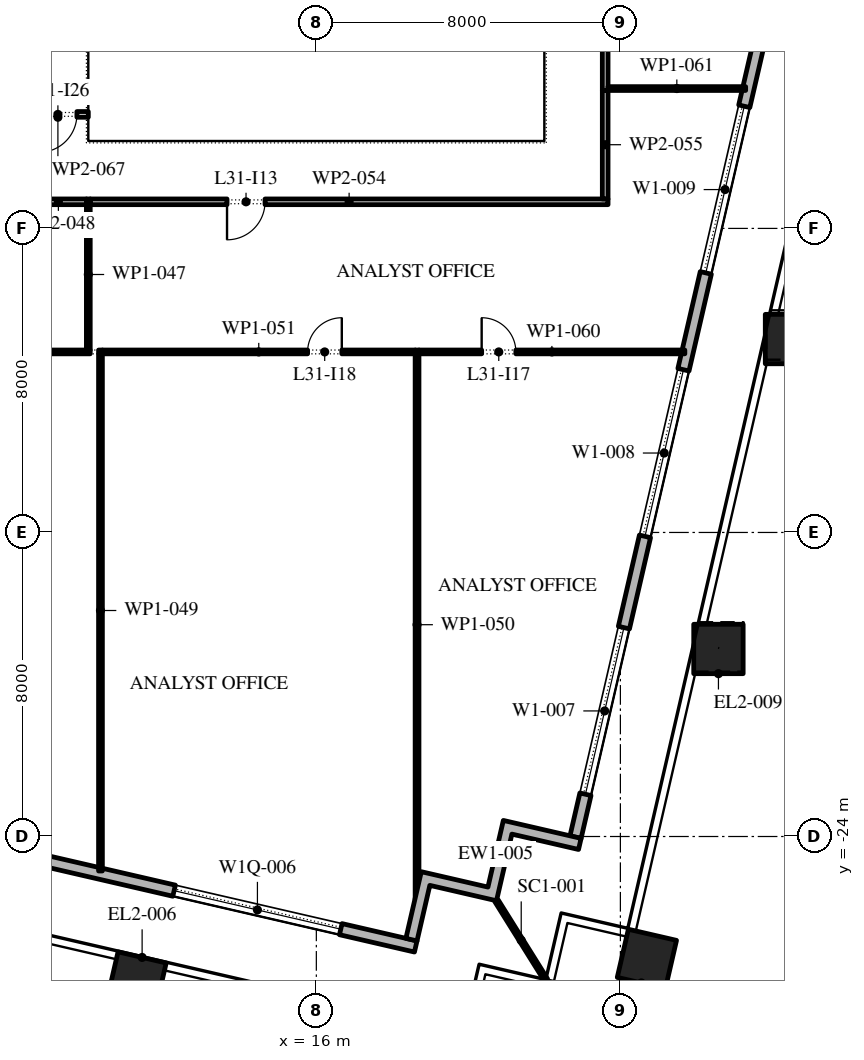
"""IFC4 building model, lengths in metres.
Left out: names, types, materials, properties, quantities, classifications, styles, units other than length and angle.
Written with IfcOpenShell. Run it as: python <this file> out.ifc"""

import sys

from ifc_helpers import new_model, si_unit, direction, frame, frame_2d, origin, origin_2d, place, context, subcontext, project, spatial, polyline, rectangle, outline, extrude, element, fill, save


model = new_model("IFC4")
c1 = context("Model", 3, precision=1e-05, world=origin(), true_north=direction((0.0, 1.0)))
c2 = subcontext(c1, "Body", "Model", "MODEL_VIEW")
j1 = project(units=[si_unit("LENGTHUNIT", "METRE"), si_unit("PLANEANGLEUNIT", "RADIAN")], contexts=[c1])
p1 = place(None, origin())
s1 = spatial("IfcSite", under=j1, at=p1, CompositionType="ELEMENT")
p2 = place(p1, origin())
s2 = spatial("IfcBuilding", under=s1, at=p2, CompositionType="ELEMENT")
p3 = place(p2, frame((0.0, 0.0, 143.4)))
s3 = spatial("IfcBuildingStorey", under=s2, at=p3, CompositionType="ELEMENT", Elevation=143.4)
for number, where, z_axis, x_axis in (
    (1, (11.27, -27.815, 0.0), (0.0, 0.0, 1.0), (0.974, -0.225, 0.0)),
    (2, (24.698, -27.22, 0.0), (0.0, 0.0, 1.0), (0.974, -0.225, 0.0)),
):
    element("IfcColumn", number, at=place(p3, frame(where, z_axis=z_axis, x_axis=x_axis)), inside=s3, PredefinedType="COLUMN", context=c2, shape_type="SweptSolid", body=[
        extrude(rectangle(XDim=1.3, YDim=1.3, at=origin_2d()), origin(), (0.0, 0.0, 1.0), 4.2),
    ])
p4 = place(p3, frame((26.58, -19.066, 0.0), z_axis=(0.002964175891, 0.012670398905, 0.999915333742), x_axis=(-0.973709261374, 0.227794368487, 0.0)))
e3 = element("IfcColumn", 3, at=p4, inside=s3, PredefinedType="COLUMN", context=c2, shape_type="SweptSolid", body=[
    extrude(rectangle(XDim=1.3, YDim=1.3, at=origin_2d()), origin(), (0.0, 0.0, 1.0), 4.2),
])
p5 = place(p3, frame((28.463, -10.911, 0.0), z_axis=(0.005810637908, 0.02533438128, 0.999662145733), x_axis=(-0.974691740237, 0.22355315143, 0.0)))
e4 = element("IfcColumn", 4, at=p5, inside=s3, PredefinedType="COLUMN", context=c2, shape_type="SweptSolid", body=[
    extrude(rectangle(XDim=1.3, YDim=1.3, at=origin_2d()), origin(), (0.0, 0.0, 1.0), 4.202),
])
p6 = place(p3, frame((22.539, -28.569, 0.0), z_axis=(0.0, 0.0, 1.0), x_axis=(0.974370064785, -0.224951054344, 0.0)))
e5 = element("IfcColumn", 5, at=p6, inside=s3, PredefinedType="COLUMN", context=c2, shape_type="SweptSolid", body=[
    extrude(rectangle(XDim=1.3, YDim=1.3, at=origin_2d()), origin(), (0.0, 0.0, 1.0), 4.2),
])
p7 = place(p3, frame((-31.078, -15.421, 0.0), z_axis=(0.0, 0.0, 1.0), x_axis=(0.974370456532, -0.224949357493, 0.0)))
e6 = element("IfcWall", 6, at=p7, inside=s3, PredefinedType="STANDARD", context=c2, shape_type="SweptSolid", body=[
    extrude(rectangle(XDim=51.0, YDim=0.3, at=frame_2d((25.5, 0.0))), origin(), (0.0, 0.0, 1.0), 4.0),
])
p8 = place(p7, frame((1.875, 0.0, 0.45)))
e7 = element("IfcOpeningElement", 7, at=p8, cuts=e6, PredefinedType="OPENING", context=c2, shape_type="SweptSolid", body=[
    extrude(rectangle(XDim=4.5, YDim=2.575, at=frame_2d((2.25, 1.288))), frame((0.0, 0.16, 0.0), z_axis=(0.0, -1.0, 0.0), x_axis=(1.0, 0.0, 0.0)), (0.0, 0.0, 1.0), 0.32),
])
p9 = place(p7, frame((10.275, 0.0, 0.45)))
e8 = element("IfcOpeningElement", 8, at=p9, cuts=e6, PredefinedType="OPENING", context=c2, shape_type="SweptSolid", body=[
    extrude(rectangle(XDim=4.5, YDim=2.525, at=frame_2d((2.25, 1.262))), frame((0.0, 0.16, 0.0), z_axis=(0.0, -1.0, 0.0), x_axis=(1.0, 0.0, 0.0)), (0.0, 0.0, 1.0), 0.32),
])
p10 = place(p7, frame((18.825, 0.0, 0.45)))
e9 = element("IfcOpeningElement", 9, at=p10, cuts=e6, PredefinedType="OPENING", context=c2, shape_type="SweptSolid", body=[
    extrude(rectangle(XDim=4.5, YDim=2.5, at=frame_2d((2.25, 1.25))), frame((0.0, 0.16, 0.0), z_axis=(0.0, -1.0, 0.0), x_axis=(1.0, 0.0, 0.0)), (0.0, 0.0, 1.0), 0.32),
])
p11 = place(p7, frame((27.075, 0.0, 0.0)))
e10 = element("IfcOpeningElement", 10, at=p11, cuts=e6, PredefinedType="OPENING", context=c2, shape_type="SweptSolid", body=[
    extrude(rectangle(XDim=2.4, YDim=3.5, at=frame_2d((1.2, 1.75))), frame((0.0, 0.16, 0.0), z_axis=(0.0, -1.0, 0.0), x_axis=(1.0, 0.0, 0.0)), (0.0, 0.0, 1.0), 0.32),
])
p12 = place(p7, frame((35.925, 0.0, 0.45)))
e11 = element("IfcOpeningElement", 11, at=p12, cuts=e6, PredefinedType="OPENING", context=c2, shape_type="SweptSolid", body=[
    extrude(rectangle(XDim=4.5, YDim=2.45, at=frame_2d((2.25, 1.225))), frame((0.0, 0.16, 0.0), z_axis=(0.0, -1.0, 0.0), x_axis=(1.0, 0.0, 0.0)), (0.0, 0.0, 1.0), 0.32),
])
p13 = place(p7, frame((44.475, 0.0, 0.45)))
e12 = element("IfcOpeningElement", 12, at=p13, cuts=e6, PredefinedType="OPENING", context=c2, shape_type="SweptSolid", body=[
    extrude(rectangle(XDim=4.5, YDim=2.45, at=frame_2d((2.25, 1.225))), frame((0.0, 0.16, 0.0), z_axis=(0.0, -1.0, 0.0), x_axis=(1.0, 0.0, 0.0)), (0.0, 0.0, 1.0), 0.32),
])
p14 = place(p3, frame((22.82, -24.016, 0.0), z_axis=(0.0, 0.0, 1.0), x_axis=(0.224953880882, 0.974369412223, 0.0)))
e13 = element("IfcWall", 13, at=p14, inside=s3, PredefinedType="STANDARD", context=c2, shape_type="SweptSolid", body=[
    extrude(rectangle(XDim=49.5, YDim=0.3, at=frame_2d((24.75, 0.0))), origin(), (0.0, 0.0, 1.0), 4.0),
])
p15 = place(p14, frame((1.157, 0.0, 0.45)))
e14 = element("IfcOpeningElement", 14, at=p15, cuts=e13, PredefinedType="OPENING", context=c2, shape_type="SweptSolid", body=[
    extrude(rectangle(XDim=4.5, YDim=3.05, at=frame_2d((2.25, 1.525))), frame((0.0, 0.16, 0.0), z_axis=(0.0, -1.0, 0.0), x_axis=(1.0, 0.0, 0.0)), (0.0, 0.0, 1.0), 0.32),
])
p16 = place(p14, frame((8.121, 0.0, 0.45)))
e15 = element("IfcOpeningElement", 15, at=p16, cuts=e13, PredefinedType="OPENING", context=c2, shape_type="SweptSolid", body=[
    extrude(rectangle(XDim=4.5, YDim=3.05, at=frame_2d((2.25, 1.525))), frame((0.0, 0.16, 0.0), z_axis=(0.0, -1.0, 0.0), x_axis=(1.0, 0.0, 0.0)), (0.0, 0.0, 1.0), 0.32),
])
p17 = place(p14, frame((15.236, 0.0, 0.45)))
e16 = element("IfcOpeningElement", 16, at=p17, cuts=e13, PredefinedType="OPENING", context=c2, shape_type="SweptSolid", body=[
    extrude(rectangle(XDim=4.5, YDim=3.05, at=frame_2d((2.25, 1.525))), frame((0.0, 0.16, 0.0), z_axis=(0.0, -1.0, 0.0), x_axis=(1.0, 0.0, 0.0)), (0.0, 0.0, 1.0), 0.32),
])
p18 = place(p14, frame((23.4, 0.0, 0.0)))
e17 = element("IfcOpeningElement", 17, at=p18, cuts=e13, PredefinedType="OPENING", context=c2, shape_type="SweptSolid", body=[
    extrude(rectangle(XDim=2.4, YDim=3.5, at=frame_2d((1.2, 1.75))), frame((0.0, 0.16, 0.0), z_axis=(0.0, -1.0, 0.0), x_axis=(1.0, 0.0, 0.0)), (0.0, 0.0, 1.0), 0.32),
])
p19 = place(p14, frame((29.464, 0.0, 0.45)))
e18 = element("IfcOpeningElement", 18, at=p19, cuts=e13, PredefinedType="OPENING", context=c2, shape_type="SweptSolid", body=[
    extrude(rectangle(XDim=4.5, YDim=2.875, at=frame_2d((2.25, 1.438))), frame((0.0, 0.16, 0.0), z_axis=(0.0, -1.0, 0.0), x_axis=(1.0, 0.0, 0.0)), (0.0, 0.0, 1.0), 0.32),
])
p20 = place(p14, frame((36.579, 0.0, 0.45)))
e19 = element("IfcOpeningElement", 19, at=p20, cuts=e13, PredefinedType="OPENING", context=c2, shape_type="SweptSolid", body=[
    extrude(rectangle(XDim=4.5, YDim=2.825, at=frame_2d((2.25, 1.413))), frame((0.0, 0.16, 0.0), z_axis=(0.0, -1.0, 0.0), x_axis=(1.0, 0.0, 0.0)), (0.0, 0.0, 1.0), 0.32),
])
p21 = place(p14, frame((43.693, 0.0, 0.45)))
e20 = element("IfcOpeningElement", 20, at=p21, cuts=e13, PredefinedType="OPENING", context=c2, shape_type="SweptSolid", body=[
    extrude(rectangle(XDim=4.5, YDim=2.75, at=frame_2d((2.25, 1.375))), frame((0.0, 0.16, 0.0), z_axis=(0.0, -1.0, 0.0), x_axis=(1.0, 0.0, 0.0)), (0.0, 0.0, 1.0), 0.32),
])
p22 = place(p3, origin())
e21 = element("IfcWall", 21, at=p22, inside=s3, PredefinedType="STANDARD", context=c2, shape_type="SweptSolid", body=[
    extrude(outline(polyline([(20.515, -25.331), (20.92, -23.577), (22.967, -24.049), (22.899, -24.342), (21.145, -23.937), (20.74, -25.691), (18.986, -25.286), (18.649, -26.747), (18.357, -26.68), (18.762, -24.926), (20.515, -25.331)])), origin(), (0.0, 0.0, 1.0), 4.0),
])
p23 = place(p3, frame((20.74, -25.691, -0.05), z_axis=(0.0, 0.0, 1.0), x_axis=(0.529972121605, -0.848015064914, 0.0)))
e22 = element("IfcWall", 22, at=p23, inside=s3, PredefinedType="STANDARD", context=c2, shape_type="SweptSolid", body=[
    extrude(rectangle(XDim=2.455, YDim=0.1, at=frame_2d((1.228, 0.0))), origin(), (0.0, 0.0, 1.0), 4.05),
])
p24 = place(p3, frame((10.05, -11.25, 0.0), z_axis=(0.0, 0.0, 1.0), x_axis=(-1.0, 0.0, 0.0)))
e23 = element("IfcWall", 23, at=p24, inside=s3, PredefinedType="PARTITIONING", context=c2, shape_type="SweptSolid", body=[
    extrude(rectangle(XDim=11.99, YDim=0.1, at=frame_2d((5.995, 0.0))), origin(), (0.0, 0.0, 1.0), 4.0),
])
p25 = place(p24, frame((4.44, 0.0, 0.0)))
e24 = element("IfcOpeningElement", 24, at=p25, cuts=e23, PredefinedType="OPENING", context=c2, shape_type="SweptSolid", body=[
    extrude(rectangle(XDim=0.9, YDim=2.1, at=frame_2d((0.45, 1.05))), frame((0.0, 0.06, 0.0), z_axis=(0.0, -1.0, 0.0), x_axis=(1.0, 0.0, 0.0)), (0.0, 0.0, 1.0), 0.12),
])
p26 = place(p3, frame((10.0, -11.2, 0.0), z_axis=(0.0, 0.0, 1.0), x_axis=(0.0, 1.0, 0.0)))
e25 = element("IfcWall", 25, at=p26, inside=s3, PredefinedType="PARTITIONING", context=c2, shape_type="SweptSolid", body=[
    extrude(rectangle(XDim=3.975, YDim=0.1, at=frame_2d((1.987, 0.0))), origin(), (0.0, 0.0, 1.0), 4.0),
])
p27 = place(p3, frame((9.95, -7.3, 0.0), z_axis=(0.0, 0.0, 1.0), x_axis=(-1.0, 0.0, 0.0)))
e26 = element("IfcWall", 26, at=p27, inside=s3, PredefinedType="PARTITIONING", context=c2, shape_type="SweptSolid", body=[
    extrude(rectangle(XDim=1.475, YDim=0.15, at=frame_2d((0.737, 0.0))), origin(), (0.0, 0.0, 1.0), 4.0),
])
p28 = place(p3, frame((10.32, -24.907, 0.0), z_axis=(0.0, 0.0, 1.0), x_axis=(0.0, 1.0, 0.0)))
e27 = element("IfcWall", 27, at=p28, inside=s3, PredefinedType="PARTITIONING", context=c2, shape_type="SweptSolid", body=[
    extrude(rectangle(XDim=13.707, YDim=0.1, at=frame_2d((6.854, 0.0))), origin(), (0.0, 0.0, 1.0), 4.0),
])
p29 = place(p3, frame((18.65, -25.654, 0.0), z_axis=(0.0, 0.0, 1.0), x_axis=(0.0, 1.0, 0.0)))
e28 = element("IfcWall", 28, at=p29, inside=s3, PredefinedType="PARTITIONING", context=c2, shape_type="SweptSolid", body=[
    extrude(rectangle(XDim=14.454, YDim=0.1, at=frame_2d((7.227, 0.0))), origin(), (0.0, 0.0, 1.0), 4.0),
])
p30 = place(p3, frame((18.6, -11.25, 0.0), z_axis=(0.0, 0.0, 1.0), x_axis=(-1.0, 0.0, 0.0)))
e29 = element("IfcWall", 29, at=p30, inside=s3, PredefinedType="PARTITIONING", context=c2, shape_type="SweptSolid", body=[
    extrude(rectangle(XDim=8.23, YDim=0.1, at=frame_2d((4.115, 0.0))), origin(), (0.0, 0.0, 1.0), 4.0),
])
p31 = place(p30, frame((1.93, 0.0, 0.0)))
e30 = element("IfcOpeningElement", 30, at=p31, cuts=e29, PredefinedType="OPENING", context=c2, shape_type="SweptSolid", body=[
    extrude(rectangle(XDim=0.9, YDim=2.1, at=frame_2d((0.45, 1.05))), frame((0.0, 0.06, 0.0), z_axis=(0.0, -1.0, 0.0), x_axis=(1.0, 0.0, 0.0)), (0.0, 0.0, 1.0), 0.12),
])
p32 = place(p3, frame((23.675, -7.3, 0.0), z_axis=(0.0, 0.0, 1.0), x_axis=(-1.0, 0.0, 0.0)))
e31 = element("IfcWall", 31, at=p32, inside=s3, PredefinedType="PARTITIONING", context=c2, shape_type="SweptSolid", body=[
    extrude(rectangle(XDim=13.625, YDim=0.15, at=frame_2d((6.812, 0.0))), origin(), (0.0, 0.0, 1.0), 4.0),
])
p33 = place(p32, frame((9.025, 0.0, 0.0)))
e32 = element("IfcOpeningElement", 32, at=p33, cuts=e31, PredefinedType="OPENING", context=c2, shape_type="SweptSolid", body=[
    extrude(rectangle(XDim=1.0, YDim=2.1, at=frame_2d((0.5, 1.05))), frame((0.0, 0.085, 0.0), z_axis=(0.0, -1.0, 0.0), x_axis=(1.0, 0.0, 0.0)), (0.0, 0.0, 1.0), 0.17),
])
p34 = place(p3, frame((23.6, -4.37, 0.0), z_axis=(0.0, 0.0, 1.0), x_axis=(0.0, -1.0, 0.0)))
e33 = element("IfcWall", 33, at=p34, inside=s3, PredefinedType="PARTITIONING", context=c2, shape_type="SweptSolid", body=[
    extrude(rectangle(XDim=2.855, YDim=0.15, at=frame_2d((1.427, 0.0))), origin(), (0.0, 0.0, 1.0), 4.0),
])
p35 = place(p3, frame((23.6, 10.44, 0.0), z_axis=(0.0, 0.0, 1.0), x_axis=(0.0, -1.0, 0.0)))
e34 = element("IfcWall", 34, at=p35, inside=s3, PredefinedType="PARTITIONING", context=c2, shape_type="SweptSolid", body=[
    extrude(rectangle(XDim=14.81, YDim=0.15, at=frame_2d((7.405, 0.0))), origin(), (0.0, 0.0, 1.0), 4.0),
])
p36 = place(p35, frame((6.86, 0.0, 0.0)))
e35 = element("IfcOpeningElement", 35, at=p36, cuts=e34, PredefinedType="OPENING", context=c2, shape_type="SweptSolid", body=[
    extrude(rectangle(XDim=1.0, YDim=2.1, at=frame_2d((0.5, 1.05))), frame((0.0, 0.085, 0.0), z_axis=(0.0, -1.0, 0.0), x_axis=(1.0, 0.0, 0.0)), (0.0, 0.0, 1.0), 0.17),
])
p37 = place(p3, frame((25.696, -11.25, 0.0), z_axis=(0.0, 0.0, 1.0), x_axis=(-1.0, 0.0, 0.0)))
e36 = element("IfcWall", 36, at=p37, inside=s3, PredefinedType="PARTITIONING", context=c2, shape_type="SweptSolid", body=[
    extrude(rectangle(XDim=6.996, YDim=0.1, at=frame_2d((3.498, 0.0))), origin(), (0.0, 0.0, 1.0), 4.0),
])
p38 = place(p37, frame((4.446, 0.0, 0.0)))
e37 = element("IfcOpeningElement", 37, at=p38, cuts=e36, PredefinedType="OPENING", context=c2, shape_type="SweptSolid", body=[
    extrude(rectangle(XDim=0.9, YDim=2.1, at=frame_2d((0.45, 1.05))), frame((0.0, 0.06, 0.0), z_axis=(0.0, -1.0, 0.0), x_axis=(1.0, 0.0, 0.0)), (0.0, 0.0, 1.0), 0.12),
])
p39 = place(p3, frame((27.296, -4.32, 0.0), z_axis=(0.0, 0.0, 1.0), x_axis=(-1.0, 0.0, 0.0)))
e38 = element("IfcWall", 38, at=p39, inside=s3, PredefinedType="PARTITIONING", context=c2, shape_type="SweptSolid", body=[
    extrude(rectangle(XDim=3.621, YDim=0.1, at=frame_2d((1.811, 0.0))), origin(), (0.0, 0.0, 1.0), 4.0),
])
p40 = place(p3, frame((10.0, -5.0, 0.0), z_axis=(0.0, 0.0, 1.0), x_axis=(-1.0, 0.0, 0.0)))
e39 = element("IfcWall", 39, at=p40, inside=s3, PredefinedType="PARTITIONING", context=c2, shape_type="SweptSolid", body=[
    extrude(rectangle(XDim=1.6, YDim=0.15, at=frame_2d((0.8, 0.0))), origin(), (0.0, 0.0, 1.0), 4.0),
])
p41 = place(p40, frame((0.3, 0.0, 0.0)))
e40 = element("IfcOpeningElement", 40, at=p41, cuts=e39, PredefinedType="OPENING", context=c2, shape_type="SweptSolid", body=[
    extrude(rectangle(XDim=1.0, YDim=2.1, at=frame_2d((0.5, 1.05))), frame((0.0, 0.085, 0.0), z_axis=(0.0, -1.0, 0.0), x_axis=(1.0, 0.0, 0.0)), (0.0, 0.0, 1.0), 0.17),
])
p42 = place(p13, origin())
e41 = element("IfcWindow", 41, at=p42, inside=s3, PartitioningType="DOUBLE_PANEL_VERTICAL", PredefinedType="WINDOW", context=c2, shape_type="SweptSolid", body=[
    extrude(rectangle(XDim=4.5, YDim=2.45, at=frame_2d((2.25, 1.225))), frame((0.0, 0.03, 0.0), z_axis=(0.0, -1.0, 0.0), x_axis=(1.0, 0.0, 0.0)), (0.0, 0.0, 1.0), 0.06),
])
fill(e12, e41)
p43 = place(p15, origin())
e42 = element("IfcWindow", 42, at=p43, inside=s3, PartitioningType="DOUBLE_PANEL_VERTICAL", PredefinedType="WINDOW", context=c2, shape_type="SweptSolid", body=[
    extrude(rectangle(XDim=4.5, YDim=3.05, at=frame_2d((2.25, 1.525))), frame((0.0, 0.03, 0.0), z_axis=(0.0, -1.0, 0.0), x_axis=(1.0, 0.0, 0.0)), (0.0, 0.0, 1.0), 0.06),
])
fill(e14, e42)
p44 = place(p16, origin())
e43 = element("IfcWindow", 43, at=p44, inside=s3, PartitioningType="DOUBLE_PANEL_VERTICAL", PredefinedType="WINDOW", context=c2, shape_type="SweptSolid", body=[
    extrude(rectangle(XDim=4.5, YDim=3.05, at=frame_2d((2.25, 1.525))), frame((0.0, 0.03, 0.0), z_axis=(0.0, -1.0, 0.0), x_axis=(1.0, 0.0, 0.0)), (0.0, 0.0, 1.0), 0.06),
])
fill(e15, e43)
p45 = place(p17, origin())
e44 = element("IfcWindow", 44, at=p45, inside=s3, PartitioningType="DOUBLE_PANEL_VERTICAL", PredefinedType="WINDOW", context=c2, shape_type="SweptSolid", body=[
    extrude(rectangle(XDim=4.5, YDim=3.05, at=frame_2d((2.25, 1.525))), frame((0.0, 0.03, 0.0), z_axis=(0.0, -1.0, 0.0), x_axis=(1.0, 0.0, 0.0)), (0.0, 0.0, 1.0), 0.06),
])
fill(e16, e44)
p46 = place(p33, origin())
e45 = element("IfcDoor", 45, at=p46, inside=s3, OperationType="SINGLE_SWING_LEFT", PredefinedType="DOOR", context=c2, shape_type="SweptSolid", body=[
    extrude(rectangle(XDim=1.0, YDim=2.1, at=frame_2d((0.5, 1.05))), frame((0.0, 0.025, 0.0), z_axis=(0.0, -1.0, 0.0), x_axis=(1.0, 0.0, 0.0)), (0.0, 0.0, 1.0), 0.05),
])
fill(e32, e45)
p47 = place(p38, frame((0.9, 0.0, 0.0), z_axis=(0.0, 0.0, 1.0), x_axis=(-1.0, 0.0, 0.0)))
e46 = element("IfcDoor", 46, at=p47, inside=s3, OperationType="SINGLE_SWING_RIGHT", PredefinedType="DOOR", context=c2, shape_type="SweptSolid", body=[
    extrude(rectangle(XDim=0.9, YDim=2.1, at=frame_2d((0.45, 1.05))), frame((0.0, 0.025, 0.0), z_axis=(0.0, -1.0, 0.0), x_axis=(1.0, 0.0, 0.0)), (0.0, 0.0, 1.0), 0.05),
])
fill(e37, e46)
p48 = place(p31, frame((0.9, 0.0, 0.0), z_axis=(0.0, 0.0, 1.0), x_axis=(-1.0, 0.0, 0.0)))
e47 = element("IfcDoor", 47, at=p48, inside=s3, OperationType="SINGLE_SWING_LEFT", PredefinedType="DOOR", context=c2, shape_type="SweptSolid", body=[
    extrude(rectangle(XDim=0.9, YDim=2.1, at=frame_2d((0.45, 1.05))), frame((0.0, 0.025, 0.0), z_axis=(0.0, -1.0, 0.0), x_axis=(1.0, 0.0, 0.0)), (0.0, 0.0, 1.0), 0.05),
])
fill(e30, e47)
p49 = place(p41, origin())
e48 = element("IfcDoor", 48, at=p49, inside=s3, OperationType="SINGLE_SWING_LEFT", PredefinedType="DOOR", context=c2, shape_type="SweptSolid", body=[
    extrude(rectangle(XDim=1.0, YDim=2.1, at=frame_2d((0.5, 1.05))), frame((0.0, 0.025, 0.0), z_axis=(0.0, -1.0, 0.0), x_axis=(1.0, 0.0, 0.0)), (0.0, 0.0, 1.0), 0.05),
])
fill(e40, e48)
save(model, sys.argv[1])
